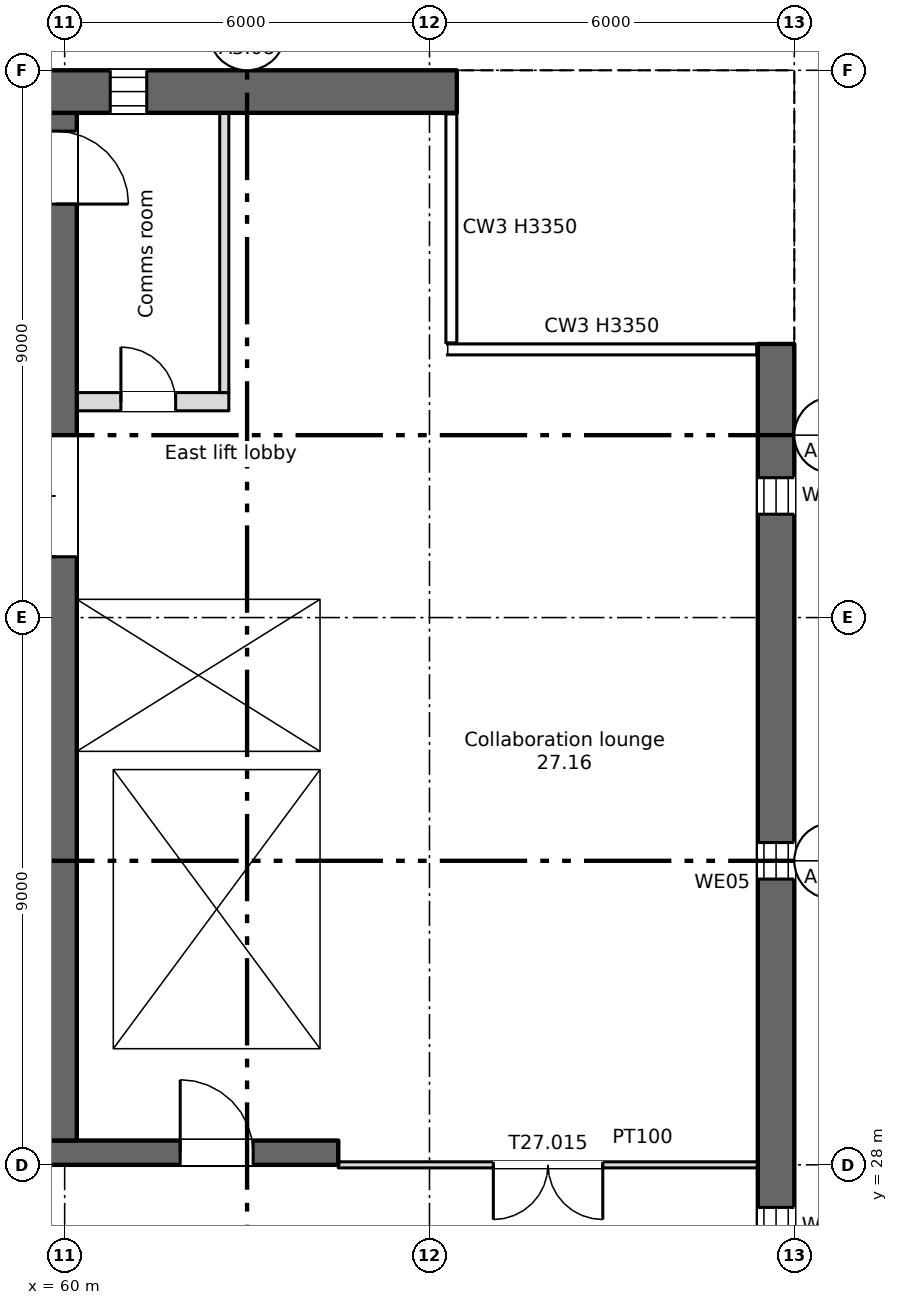
"""IFC4 building model, lengths in metres.
Left out: names, types, materials, properties, quantities, classifications, styles, units other than length and angle.
Written with IfcOpenShell. Run it as: python <this file> out.ifc"""

import sys

from ifc_helpers import new_model, si_unit, direction, frame, frame_2d, origin, place, context, subcontext, project, spatial, rectangle, extrude, element, fill, save


model = new_model("IFC4")
c1 = context("Model", 3, precision=1e-05, world=origin(), true_north=direction((0.0, 1.0)))
c2 = subcontext(c1, "Body", "Model", "MODEL_VIEW")
j1 = project(units=[si_unit("LENGTHUNIT", "METRE"), si_unit("PLANEANGLEUNIT", "RADIAN")], contexts=[c1])
p1 = place(None, origin())
s1 = spatial("IfcSite", under=j1, at=p1, CompositionType="ELEMENT")
p2 = place(p1, origin())
s2 = spatial("IfcBuilding", under=s1, at=p2, CompositionType="ELEMENT")
p3 = place(p2, frame((0.0, 0.0, 189.25)))
s3 = spatial("IfcBuildingStorey", under=s2, at=p3, CompositionType="ELEMENT", Elevation=189.25)
p4 = place(p3, frame((71.7, 7.5, 0.0), z_axis=(0.0, 0.0, 1.0), x_axis=(0.0, 1.0, 0.0)))
e1 = element("IfcWall", 1, at=p4, inside=s3, PredefinedType="SHEAR", context=c2, shape_type="SweptSolid", body=[
    extrude(rectangle(XDim=34.0, YDim=0.6, at=frame_2d((17.0, 0.0))), origin(), (0.0, 0.0, 1.0), 3.35),
])
p5 = place(p4, frame((1.2, 0.0, 0.6)))
e2 = element("IfcOpeningElement", 2, at=p5, cuts=e1, PredefinedType="OPENING", context=c2, shape_type="SweptSolid", body=[
    extrude(rectangle(XDim=0.6, YDim=2.4, at=frame_2d((0.3, 1.2))), frame((0.0, 0.31, 0.0), z_axis=(0.0, -1.0, 0.0), x_axis=(1.0, 0.0, 0.0)), (0.0, 0.0, 1.0), 0.62),
])
p6 = place(p4, frame((7.2, 0.0, 0.6)))
e3 = element("IfcOpeningElement", 3, at=p6, cuts=e1, PredefinedType="OPENING", context=c2, shape_type="SweptSolid", body=[
    extrude(rectangle(XDim=0.6, YDim=2.4, at=frame_2d((0.3, 1.2))), frame((0.0, 0.31, 0.0), z_axis=(0.0, -1.0, 0.0), x_axis=(1.0, 0.0, 0.0)), (0.0, 0.0, 1.0), 0.62),
])
p7 = place(p4, frame((13.2, 0.0, 0.6)))
e4 = element("IfcOpeningElement", 4, at=p7, cuts=e1, PredefinedType="OPENING", context=c2, shape_type="SweptSolid", body=[
    extrude(rectangle(XDim=0.6, YDim=2.4, at=frame_2d((0.3, 1.2))), frame((0.0, 0.31, 0.0), z_axis=(0.0, -1.0, 0.0), x_axis=(1.0, 0.0, 0.0)), (0.0, 0.0, 1.0), 0.62),
])
p8 = place(p4, frame((19.2, 0.0, 0.6)))
e5 = element("IfcOpeningElement", 5, at=p8, cuts=e1, PredefinedType="OPENING", context=c2, shape_type="SweptSolid", body=[
    extrude(rectangle(XDim=0.6, YDim=2.4, at=frame_2d((0.3, 1.2))), frame((0.0, 0.31, 0.0), z_axis=(0.0, -1.0, 0.0), x_axis=(1.0, 0.0, 0.0)), (0.0, 0.0, 1.0), 0.62),
])
p9 = place(p4, frame((25.2, 0.0, 0.6)))
e6 = element("IfcOpeningElement", 6, at=p9, cuts=e1, PredefinedType="OPENING", context=c2, shape_type="SweptSolid", body=[
    extrude(rectangle(XDim=0.6, YDim=2.4, at=frame_2d((0.3, 1.2))), frame((0.0, 0.31, 0.0), z_axis=(0.0, -1.0, 0.0), x_axis=(1.0, 0.0, 0.0)), (0.0, 0.0, 1.0), 0.62),
])
p10 = place(p4, frame((31.2, 0.0, 0.6)))
e7 = element("IfcOpeningElement", 7, at=p10, cuts=e1, PredefinedType="OPENING", context=c2, shape_type="SweptSolid", body=[
    extrude(rectangle(XDim=0.6, YDim=2.4, at=frame_2d((0.3, 1.2))), frame((0.0, 0.31, 0.0), z_axis=(0.0, -1.0, 0.0), x_axis=(1.0, 0.0, 0.0)), (0.0, 0.0, 1.0), 0.62),
])
p11 = place(p3, frame((11.55, 45.65, 0.0), z_axis=(0.0, 0.0, 1.0), x_axis=(1.0, 0.0, 0.0)))
e8 = element("IfcWall", 8, at=p11, inside=s3, PredefinedType="SHEAR", context=c2, shape_type="SweptSolid", body=[
    extrude(rectangle(XDim=54.9, YDim=0.7, at=frame_2d((27.45, 0.0))), origin(), (0.0, 0.0, 1.0), 3.35),
])
p12 = place(p11, frame((1.2, 0.0, 0.6)))
e9 = element("IfcOpeningElement", 9, at=p12, cuts=e8, PredefinedType="OPENING", context=c2, shape_type="SweptSolid", body=[
    extrude(rectangle(XDim=0.6, YDim=2.4, at=frame_2d((0.3, 1.2))), frame((0.0, 0.36, 0.0), z_axis=(0.0, -1.0, 0.0), x_axis=(1.0, 0.0, 0.0)), (0.0, 0.0, 1.0), 0.72),
])
p13 = place(p11, frame((49.2, 0.0, 0.6)))
e10 = element("IfcOpeningElement", 10, at=p13, cuts=e8, PredefinedType="OPENING", context=c2, shape_type="SweptSolid", body=[
    extrude(rectangle(XDim=0.6, YDim=2.4, at=frame_2d((0.3, 1.2))), frame((0.0, 0.36, 0.0), z_axis=(0.0, -1.0, 0.0), x_axis=(1.0, 0.0, 0.0)), (0.0, 0.0, 1.0), 0.72),
])
p14 = place(p3, frame((6.6, 28.2, 0.0), z_axis=(0.0, 0.0, 1.0), x_axis=(1.0, 0.0, 0.0)))
e11 = element("IfcWall", 11, at=p14, inside=s3, PredefinedType="SHEAR", context=c2, shape_type="SweptSolid", body=[
    extrude(rectangle(XDim=57.9, YDim=0.4, at=frame_2d((28.95, 0.0))), origin(), (0.0, 0.0, 1.0), 3.35),
])
p15 = place(p14, frame((12.913, 0.0, 0.0)))
e12 = element("IfcOpeningElement", 12, at=p15, cuts=e11, PredefinedType="OPENING", context=c2, shape_type="SweptSolid", body=[
    extrude(rectangle(XDim=0.9, YDim=2.1, at=frame_2d((0.45, 1.05))), frame((0.0, 0.21, 0.0), z_axis=(0.0, -1.0, 0.0), x_axis=(1.0, 0.0, 0.0)), (0.0, 0.0, 1.0), 0.42),
])
p16 = place(p14, frame((15.488, 0.0, 0.0)))
e13 = element("IfcOpeningElement", 13, at=p16, cuts=e11, PredefinedType="OPENING", context=c2, shape_type="SweptSolid", body=[
    extrude(rectangle(XDim=0.9, YDim=2.1, at=frame_2d((0.45, 1.05))), frame((0.0, 0.21, 0.0), z_axis=(0.0, -1.0, 0.0), x_axis=(1.0, 0.0, 0.0)), (0.0, 0.0, 1.0), 0.42),
])
p17 = place(p14, frame((48.413, 0.0, 0.0)))
e14 = element("IfcOpeningElement", 14, at=p17, cuts=e11, PredefinedType="OPENING", context=c2, shape_type="SweptSolid", body=[
    extrude(rectangle(XDim=0.9, YDim=2.1, at=frame_2d((0.45, 1.05))), frame((0.0, 0.21, 0.0), z_axis=(0.0, -1.0, 0.0), x_axis=(1.0, 0.0, 0.0)), (0.0, 0.0, 1.0), 0.42),
])
p18 = place(p14, frame((50.988, 0.0, 0.0)))
e15 = element("IfcOpeningElement", 15, at=p18, cuts=e11, PredefinedType="OPENING", context=c2, shape_type="SweptSolid", body=[
    extrude(rectangle(XDim=0.9, YDim=2.1, at=frame_2d((0.45, 1.05))), frame((0.0, 0.21, 0.0), z_axis=(0.0, -1.0, 0.0), x_axis=(1.0, 0.0, 0.0)), (0.0, 0.0, 1.0), 0.42),
])
p19 = place(p14, frame((0.663, 0.0, 0.0)))
e16 = element("IfcOpeningElement", 16, at=p19, cuts=e11, PredefinedType="OPENING", context=c2, shape_type="SweptSolid", body=[
    extrude(rectangle(XDim=0.9, YDim=2.1, at=frame_2d((0.45, 1.05))), frame((0.0, 0.21, 0.0), z_axis=(0.0, -1.0, 0.0), x_axis=(1.0, 0.0, 0.0)), (0.0, 0.0, 1.0), 0.42),
])
p20 = place(p14, frame((2.238, 0.0, 0.0)))
e17 = element("IfcOpeningElement", 17, at=p20, cuts=e11, PredefinedType="OPENING", context=c2, shape_type="SweptSolid", body=[
    extrude(rectangle(XDim=0.9, YDim=2.1, at=frame_2d((0.45, 1.05))), frame((0.0, 0.21, 0.0), z_axis=(0.0, -1.0, 0.0), x_axis=(1.0, 0.0, 0.0)), (0.0, 0.0, 1.0), 0.42),
])
p21 = place(p14, frame((4.8, 0.0, 0.0)))
e18 = element("IfcOpeningElement", 18, at=p21, cuts=e11, PredefinedType="OPENING", context=c2, shape_type="SweptSolid", body=[
    extrude(rectangle(XDim=1.2, YDim=2.1, at=frame_2d((0.6, 1.05))), frame((0.0, 0.21, 0.0), z_axis=(0.0, -1.0, 0.0), x_axis=(1.0, 0.0, 0.0)), (0.0, 0.0, 1.0), 0.42),
])
p22 = place(p14, frame((31.8, 0.0, 0.0)))
e19 = element("IfcOpeningElement", 19, at=p22, cuts=e11, PredefinedType="OPENING", context=c2, shape_type="SweptSolid", body=[
    extrude(rectangle(XDim=1.2, YDim=2.1, at=frame_2d((0.6, 1.05))), frame((0.0, 0.21, 0.0), z_axis=(0.0, -1.0, 0.0), x_axis=(1.0, 0.0, 0.0)), (0.0, 0.0, 1.0), 0.42),
])
p23 = place(p14, frame((55.3, 0.0, 0.0)))
e20 = element("IfcOpeningElement", 20, at=p23, cuts=e11, PredefinedType="OPENING", context=c2, shape_type="SweptSolid", body=[
    extrude(rectangle(XDim=1.2, YDim=2.1, at=frame_2d((0.6, 1.05))), frame((0.0, 0.21, 0.0), z_axis=(0.0, -1.0, 0.0), x_axis=(1.0, 0.0, 0.0)), (0.0, 0.0, 1.0), 0.42),
])
p24 = place(p14, frame((21.8, 0.0, 0.0)))
e21 = element("IfcOpeningElement", 21, at=p24, cuts=e11, PredefinedType="OPENING", context=c2, shape_type="SweptSolid", body=[
    extrude(rectangle(XDim=1.2, YDim=2.1, at=frame_2d((0.6, 1.05))), frame((0.0, 0.21, 0.0), z_axis=(0.0, -1.0, 0.0), x_axis=(1.0, 0.0, 0.0)), (0.0, 0.0, 1.0), 0.42),
])
p25 = place(p14, frame((41.8, 0.0, 0.0)))
e22 = element("IfcOpeningElement", 22, at=p25, cuts=e11, PredefinedType="OPENING", context=c2, shape_type="SweptSolid", body=[
    extrude(rectangle(XDim=1.2, YDim=2.1, at=frame_2d((0.6, 1.05))), frame((0.0, 0.21, 0.0), z_axis=(0.0, -1.0, 0.0), x_axis=(1.0, 0.0, 0.0)), (0.0, 0.0, 1.0), 0.42),
])
p26 = place(p14, frame((24.95, 0.0, 0.0)))
e23 = element("IfcOpeningElement", 23, at=p26, cuts=e11, PredefinedType="OPENING", context=c2, shape_type="SweptSolid", body=[
    extrude(rectangle(XDim=2.4, YDim=2.1, at=frame_2d((1.2, 1.05))), frame((0.0, 0.21, 0.0), z_axis=(0.0, -1.0, 0.0), x_axis=(1.0, 0.0, 0.0)), (0.0, 0.0, 1.0), 0.42),
])
p27 = place(p14, frame((37.45, 0.0, 0.0)))
e24 = element("IfcOpeningElement", 24, at=p27, cuts=e11, PredefinedType="OPENING", context=c2, shape_type="SweptSolid", body=[
    extrude(rectangle(XDim=2.4, YDim=2.1, at=frame_2d((1.2, 1.05))), frame((0.0, 0.21, 0.0), z_axis=(0.0, -1.0, 0.0), x_axis=(1.0, 0.0, 0.0)), (0.0, 0.0, 1.0), 0.42),
])
p28 = place(p14, frame((8.1, 0.0, 0.0)))
e25 = element("IfcOpeningElement", 25, at=p28, cuts=e11, PredefinedType="OPENING", context=c2, shape_type="SweptSolid", body=[
    extrude(rectangle(XDim=2.4, YDim=2.1, at=frame_2d((1.2, 1.05))), frame((0.0, 0.21, 0.0), z_axis=(0.0, -1.0, 0.0), x_axis=(1.0, 0.0, 0.0)), (0.0, 0.0, 1.0), 0.42),
])
p29 = place(p14, frame((28.95, 0.0, 0.0)))
e26 = element("IfcOpeningElement", 26, at=p29, cuts=e11, PredefinedType="OPENING", context=c2, shape_type="SweptSolid", body=[
    extrude(rectangle(XDim=0.9, YDim=2.1, at=frame_2d((0.45, 1.05))), frame((0.0, 0.21, 0.0), z_axis=(0.0, -1.0, 0.0), x_axis=(1.0, 0.0, 0.0)), (0.0, 0.0, 1.0), 0.42),
])
p30 = place(p14, frame((34.95, 0.0, 0.0)))
e27 = element("IfcOpeningElement", 27, at=p30, cuts=e11, PredefinedType="OPENING", context=c2, shape_type="SweptSolid", body=[
    extrude(rectangle(XDim=0.9, YDim=2.1, at=frame_2d((0.45, 1.05))), frame((0.0, 0.21, 0.0), z_axis=(0.0, -1.0, 0.0), x_axis=(1.0, 0.0, 0.0)), (0.0, 0.0, 1.0), 0.42),
])
p31 = place(p3, frame((64.35, 34.8, 0.0), z_axis=(0.0, 0.0, 1.0), x_axis=(0.0, 1.0, 0.0)))
e28 = element("IfcWall", 28, at=p31, inside=s3, PredefinedType="SHEAR", context=c2, shape_type="SweptSolid", body=[
    extrude(rectangle(XDim=10.5, YDim=0.3, at=frame_2d((5.25, 0.0))), origin(), (0.0, 0.0, 1.0), 3.35),
])
p32 = place(p3, frame((59.85, 28.4, 0.0), z_axis=(0.0, 0.0, 1.0), x_axis=(0.0, 1.0, 0.0)))
e29 = element("IfcWall", 29, at=p32, inside=s3, PredefinedType="SHEAR", context=c2, shape_type="SweptSolid", body=[
    extrude(rectangle(XDim=16.9, YDim=0.7, at=frame_2d((8.45, 0.0))), origin(), (0.0, 0.0, 1.0), 3.35),
])
p33 = place(p32, frame((9.6, 0.0, 0.0)))
e30 = element("IfcOpeningElement", 30, at=p33, cuts=e29, PredefinedType="OPENING", context=c2, shape_type="SweptSolid", body=[
    extrude(rectangle(XDim=2.0, YDim=2.1, at=frame_2d((1.0, 1.05))), frame((0.0, 0.36, 0.0), z_axis=(0.0, -1.0, 0.0), x_axis=(1.0, 0.0, 0.0)), (0.0, 0.0, 1.0), 0.72),
])
p34 = place(p32, frame((15.4, 0.0, 0.0)))
e31 = element("IfcOpeningElement", 31, at=p34, cuts=e29, PredefinedType="OPENING", context=c2, shape_type="SweptSolid", body=[
    extrude(rectangle(XDim=1.2, YDim=2.1, at=frame_2d((0.6, 1.05))), frame((0.0, 0.36, 0.0), z_axis=(0.0, -1.0, 0.0), x_axis=(1.0, 0.0, 0.0)), (0.0, 0.0, 1.0), 0.72),
])
p35 = place(p3, frame((60.5, 28.4, 0.0), z_axis=(0.0, 0.0, 1.0), x_axis=(0.0, 1.0, 0.0)))
e32 = element("IfcWall", 32, at=p35, inside=s3, PredefinedType="SHEAR", context=c2, shape_type="SweptSolid", body=[
    extrude(rectangle(XDim=6.1, YDim=0.6, at=frame_2d((3.05, 0.0))), origin(), (0.0, 0.0, 1.0), 3.35),
])
p36 = place(p3, frame((64.35, 28.4, 0.0), z_axis=(0.0, 0.0, 1.0), x_axis=(0.0, 1.0, 0.0)))
e33 = element("IfcWall", 33, at=p36, inside=s3, PredefinedType="SHEAR", context=c2, shape_type="SweptSolid", body=[
    extrude(rectangle(XDim=6.1, YDim=0.3, at=frame_2d((3.05, 0.0))), origin(), (0.0, 0.0, 1.0), 3.35),
])
p37 = place(p3, frame((60.2, 34.65, 0.0), z_axis=(0.0, 0.0, 1.0), x_axis=(1.0, 0.0, 0.0)))
e34 = element("IfcWall", 34, at=p37, inside=s3, PredefinedType="SHEAR", context=c2, shape_type="SweptSolid", body=[
    extrude(rectangle(XDim=4.3, YDim=0.3, at=frame_2d((2.15, 0.0))), origin(), (0.0, 0.0, 1.0), 3.35),
])
p38 = place(p3, frame((60.2, 37.45, 0.0), z_axis=(0.0, 0.0, 1.0), x_axis=(1.0, 0.0, 0.0)))
e35 = element("IfcWall", 35, at=p38, inside=s3, PredefinedType="SHEAR", context=c2, shape_type="SweptSolid", body=[
    extrude(rectangle(XDim=4.0, YDim=0.3, at=frame_2d((2.0, 0.0))), origin(), (0.0, 0.0, 1.0), 3.35),
])
p39 = place(p38, frame((1.45, 0.0, 0.0)))
e36 = element("IfcOpeningElement", 36, at=p39, cuts=e35, PredefinedType="OPENING", context=c2, shape_type="SweptSolid", body=[
    extrude(rectangle(XDim=1.1, YDim=2.1, at=frame_2d((0.55, 1.05))), frame((0.0, 0.16, 0.0), z_axis=(0.0, -1.0, 0.0), x_axis=(1.0, 0.0, 0.0)), (0.0, 0.0, 1.0), 0.32),
])
p40 = place(p3, frame((60.2, 40.55, 0.0), z_axis=(0.0, 0.0, 1.0), x_axis=(1.0, 0.0, 0.0)))
e37 = element("IfcWall", 37, at=p40, inside=s3, PredefinedType="PARTITIONING", context=c2, shape_type="SweptSolid", body=[
    extrude(rectangle(XDim=2.5, YDim=0.3, at=frame_2d((1.25, 0.0))), origin(), (0.0, 0.0, 1.0), 3.35),
])
p41 = place(p40, frame((0.725, 0.0, 0.0)))
e38 = element("IfcOpeningElement", 38, at=p41, cuts=e37, PredefinedType="OPENING", context=c2, shape_type="SweptSolid", body=[
    extrude(rectangle(XDim=0.9, YDim=2.1, at=frame_2d((0.45, 1.05))), frame((0.0, 0.16, 0.0), z_axis=(0.0, -1.0, 0.0), x_axis=(1.0, 0.0, 0.0)), (0.0, 0.0, 1.0), 0.32),
])
p42 = place(p3, frame((62.625, 40.7, 0.0), z_axis=(0.0, 0.0, 1.0), x_axis=(0.0, 1.0, 0.0)))
e39 = element("IfcWall", 39, at=p42, inside=s3, PredefinedType="PARTITIONING", context=c2, shape_type="SweptSolid", body=[
    extrude(rectangle(XDim=4.6, YDim=0.15, at=frame_2d((2.3, 0.0))), origin(), (0.0, 0.0, 1.0), 3.35),
])
p43 = place(p3, frame((64.5, 28.0, 0.0), z_axis=(0.0, 0.0, 1.0), x_axis=(1.0, 0.0, 0.0)))
e40 = element("IfcWall", 40, at=p43, inside=s3, PredefinedType="PARTITIONING", context=c2, shape_type="SweptSolid", body=[
    extrude(rectangle(XDim=6.9, YDim=0.1, at=frame_2d((3.45, 0.0))), origin(), (0.0, 0.0, 1.0), 3.35),
])
p44 = place(p43, frame((2.55, 0.0, 0.0)))
e41 = element("IfcOpeningElement", 41, at=p44, cuts=e40, PredefinedType="OPENING", context=c2, shape_type="SweptSolid", body=[
    extrude(rectangle(XDim=1.8, YDim=2.1, at=frame_2d((0.9, 1.05))), frame((0.0, 0.06, 0.0), z_axis=(0.0, -1.0, 0.0), x_axis=(1.0, 0.0, 0.0)), (0.0, 0.0, 1.0), 0.12),
])
p45 = place(p13, origin())
e42 = element("IfcWindow", 42, at=p45, inside=s3, PartitioningType="SINGLE_PANEL", PredefinedType="WINDOW", context=c2, shape_type="SweptSolid", body=[
    extrude(rectangle(XDim=0.6, YDim=2.4, at=frame_2d((0.3, 1.2))), frame((0.0, 0.03, 0.0), z_axis=(0.0, -1.0, 0.0), x_axis=(1.0, 0.0, 0.0)), (0.0, 0.0, 1.0), 0.06),
])
fill(e10, e42)
p46 = place(p8, origin())
e43 = element("IfcWindow", 43, at=p46, inside=s3, PartitioningType="SINGLE_PANEL", PredefinedType="WINDOW", context=c2, shape_type="SweptSolid", body=[
    extrude(rectangle(XDim=0.6, YDim=2.4, at=frame_2d((0.3, 1.2))), frame((0.0, 0.03, 0.0), z_axis=(0.0, -1.0, 0.0), x_axis=(1.0, 0.0, 0.0)), (0.0, 0.0, 1.0), 0.06),
])
fill(e5, e43)
p47 = place(p9, origin())
e44 = element("IfcWindow", 44, at=p47, inside=s3, PartitioningType="SINGLE_PANEL", PredefinedType="WINDOW", context=c2, shape_type="SweptSolid", body=[
    extrude(rectangle(XDim=0.6, YDim=2.4, at=frame_2d((0.3, 1.2))), frame((0.0, 0.03, 0.0), z_axis=(0.0, -1.0, 0.0), x_axis=(1.0, 0.0, 0.0)), (0.0, 0.0, 1.0), 0.06),
])
fill(e6, e44)
p48 = place(p10, origin())
e45 = element("IfcWindow", 45, at=p48, inside=s3, PartitioningType="SINGLE_PANEL", PredefinedType="WINDOW", context=c2, shape_type="SweptSolid", body=[
    extrude(rectangle(XDim=0.6, YDim=2.4, at=frame_2d((0.3, 1.2))), frame((0.0, 0.03, 0.0), z_axis=(0.0, -1.0, 0.0), x_axis=(1.0, 0.0, 0.0)), (0.0, 0.0, 1.0), 0.06),
])
fill(e7, e45)
p49 = place(p41, origin())
e46 = element("IfcDoor", 46, at=p49, inside=s3, OperationType="SINGLE_SWING_LEFT", PredefinedType="DOOR", context=c2, shape_type="SweptSolid", body=[
    extrude(rectangle(XDim=0.9, YDim=2.1, at=frame_2d((0.45, 1.05))), frame((0.0, 0.025, 0.0), z_axis=(0.0, -1.0, 0.0), x_axis=(1.0, 0.0, 0.0)), (0.0, 0.0, 1.0), 0.05),
])
fill(e38, e46)
p50 = place(p39, origin())
e47 = element("IfcDoor", 47, at=p50, inside=s3, OperationType="SLIDING_TO_LEFT", PredefinedType="DOOR", context=c2, shape_type="SweptSolid", body=[
    extrude(rectangle(XDim=1.1, YDim=2.1, at=frame_2d((0.55, 1.05))), frame((0.0, 0.025, 0.0), z_axis=(0.0, -1.0, 0.0), x_axis=(1.0, 0.0, 0.0)), (0.0, 0.0, 1.0), 0.05),
])
fill(e36, e47)
p51 = place(p23, origin())
e48 = element("IfcDoor", 48, at=p51, inside=s3, OperationType="SINGLE_SWING_LEFT", PredefinedType="DOOR", context=c2, shape_type="SweptSolid", body=[
    extrude(rectangle(XDim=1.2, YDim=2.1, at=frame_2d((0.6, 1.05))), frame((0.0, 0.025, 0.0), z_axis=(0.0, -1.0, 0.0), x_axis=(1.0, 0.0, 0.0)), (0.0, 0.0, 1.0), 0.05),
])
fill(e20, e48)
p52 = place(p33, origin())
e49 = element("IfcDoor", 49, at=p52, inside=s3, OperationType="DOUBLE_DOOR_SINGLE_SWING", PredefinedType="DOOR", context=c2, shape_type="SweptSolid", body=[
    extrude(rectangle(XDim=2.0, YDim=2.1, at=frame_2d((1.0, 1.05))), frame((0.0, 0.025, 0.0), z_axis=(0.0, -1.0, 0.0), x_axis=(1.0, 0.0, 0.0)), (0.0, 0.0, 1.0), 0.05),
])
fill(e30, e49)
p53 = place(p34, origin())
e50 = element("IfcDoor", 50, at=p53, inside=s3, OperationType="SINGLE_SWING_LEFT", PredefinedType="DOOR", context=c2, shape_type="SweptSolid", body=[
    extrude(rectangle(XDim=1.2, YDim=2.1, at=frame_2d((0.6, 1.05))), frame((0.0, 0.025, 0.0), z_axis=(0.0, -1.0, 0.0), x_axis=(1.0, 0.0, 0.0)), (0.0, 0.0, 1.0), 0.05),
])
fill(e31, e50)
p54 = place(p44, origin())
e51 = element("IfcDoor", 51, at=p54, inside=s3, OperationType="DOUBLE_DOOR_SINGLE_SWING", PredefinedType="DOOR", context=c2, shape_type="SweptSolid", body=[
    extrude(rectangle(XDim=1.8, YDim=2.1, at=frame_2d((0.9, 1.05))), frame((0.0, 0.025, 0.0), z_axis=(0.0, -1.0, 0.0), x_axis=(1.0, 0.0, 0.0)), (0.0, 0.0, 1.0), 0.05),
])
fill(e41, e51)
save(model, sys.argv[1])
